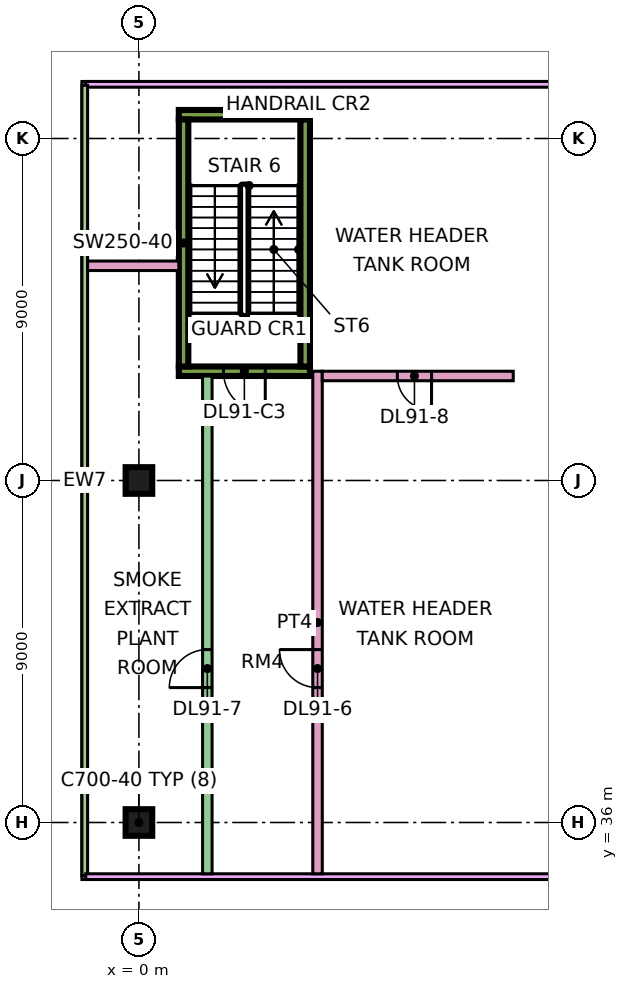
"""IFC4 building model, lengths in metres.
Left out: names, types, materials, properties, quantities, classifications, styles, units other than length and angle.
Written with IfcOpenShell. Run it as: python <this file> out.ifc"""

import sys

from ifc_helpers import new_model, si_unit, direction, frame, frame_2d, origin, origin_2d, place, context, subcontext, project, spatial, polyline, rectangle, outline, extrude, element, fill, save


model = new_model("IFC4")
c1 = context("Model", 3, precision=1e-05, world=origin(), true_north=direction((0.0, 1.0)))
c2 = subcontext(c1, "Body", "Model", "MODEL_VIEW")
j1 = project(units=[si_unit("LENGTHUNIT", "METRE"), si_unit("PLANEANGLEUNIT", "RADIAN")], contexts=[c1])
p1 = place(None, origin())
s1 = spatial("IfcSite", under=j1, at=p1, CompositionType="ELEMENT")
p2 = place(p1, origin())
s2 = spatial("IfcBuilding", under=s1, at=p2, CompositionType="ELEMENT")
p3 = place(p2, frame((0.0, 0.0, 388.9)))
s3 = spatial("IfcBuildingStorey", under=s2, at=p3, CompositionType="ELEMENT", Elevation=388.9)
for number, where, z_axis, x_axis in (
    (1, (0.0, 36.0, 0.0), (0.0, 0.0, 1.0), (1.0, 0.0, 0.0)),
    (2, (0.0, 45.0, 0.0), (0.0, 0.0, 1.0), (1.0, 0.0, 0.0)),
):
    element("IfcColumn", number, at=place(p3, frame(where, z_axis=z_axis, x_axis=x_axis)), inside=s3, PredefinedType="COLUMN", context=c2, shape_type="SweptSolid", body=[
        extrude(rectangle(XDim=0.7, YDim=0.7, at=origin_2d()), origin(), (0.0, 0.0, 1.0), 4.5),
    ])
p4 = place(p3, frame((1.05, 47.875, 0.0), z_axis=(0.0, 0.0, 1.0), x_axis=(1.0, 0.0, 0.0)))
e3 = element("IfcWall", 3, at=p4, inside=s3, PredefinedType="SHEAR", context=c2, shape_type="SweptSolid", body=[
    extrude(rectangle(XDim=3.45, YDim=0.25, at=frame_2d((1.725, 0.0))), origin(), (0.0, 0.0, 1.0), 4.5),
])
p5 = place(p4, frame((1.175, 0.0, 0.0)))
e4 = element("IfcOpeningElement", 4, at=p5, cuts=e3, PredefinedType="OPENING", context=c2, shape_type="SweptSolid", body=[
    extrude(rectangle(XDim=1.1, YDim=2.2, at=frame_2d((0.55, 1.1))), frame((0.0, 0.135, 0.0), z_axis=(0.0, -1.0, 0.0), x_axis=(1.0, 0.0, 0.0)), (0.0, 0.0, 1.0), 0.27),
])
p6 = place(p3, frame((1.05, 54.625, 0.0), z_axis=(0.0, 0.0, 1.0), x_axis=(1.0, 0.0, 0.0)))
e5 = element("IfcWall", 5, at=p6, inside=s3, PredefinedType="SHEAR", context=c2, shape_type="SweptSolid", body=[
    extrude(rectangle(XDim=3.45, YDim=0.25, at=frame_2d((1.725, 0.0))), origin(), (0.0, 0.0, 1.0), 4.5),
])
for number, where, z_axis, x_axis in (
    (6, (1.175, 48.0, 0.0), (0.0, 0.0, 1.0), (0.0, 1.0, 0.0)),
    (7, (4.375, 48.0, 0.0), (0.0, 0.0, 1.0), (0.0, 1.0, 0.0)),
):
    element("IfcWall", number, at=place(p3, frame(where, z_axis=z_axis, x_axis=x_axis)), inside=s3, PredefinedType="SHEAR", context=c2, shape_type="SweptSolid", body=[
        extrude(rectangle(XDim=6.5, YDim=0.25, at=frame_2d((3.25, 0.0))), origin(), (0.0, 0.0, 1.0), 4.5),
    ])
p7 = place(p3, frame((16.26, 55.425, 0.0), z_axis=(0.0, 0.0, 1.0), x_axis=(-1.0, 0.0, 0.0)))
e8 = element("IfcWall", 8, at=p7, inside=s3, PredefinedType="SOLIDWALL", context=c2, shape_type="SweptSolid", body=[
    extrude(outline(polyline([(0.0, 0.0), (17.659, 0.0), (17.659, 4.5), (8.726, 4.5), (7.733, 4.248), (6.741, 3.369), (5.748, 2.489), (4.756, 1.61), (3.763, 1.137), (2.771, 0.916), (1.778, 0.696), (0.785, 0.475), (0.0, 0.3), (0.0, 0.0)])), frame((0.0, 0.075, 0.0), z_axis=(0.0, -1.0, 0.0), x_axis=(1.0, 0.0, 0.0)), (0.0, 0.0, 1.0), 0.15),
])
p8 = place(p3, frame((-1.425, 55.4, 0.0), z_axis=(0.0, 0.0, 1.0), x_axis=(0.0, -1.0, 0.0)))
e9 = element("IfcWall", 9, at=p8, inside=s3, PredefinedType="SOLIDWALL", context=c2, shape_type="SweptSolid", body=[
    extrude(rectangle(XDim=20.8, YDim=0.15, at=frame_2d((10.4, 0.0))), origin(), (0.0, 0.0, 1.0), 4.1),
])
p9 = place(p3, frame((-1.4, 34.575, 0.0), z_axis=(0.0, 0.0, 1.0), x_axis=(1.0, 0.0, 0.0)))
e10 = element("IfcWall", 10, at=p9, inside=s3, PredefinedType="SOLIDWALL", context=c2, shape_type="SweptSolid", body=[
    extrude(outline(polyline([(0.0, 0.0), (17.659, 0.0), (17.659, 0.3), (13.896, 1.137), (12.904, 1.61), (9.926, 4.248), (8.933, 4.5), (0.0, 4.5), (0.0, 0.0)])), frame((0.0, 0.075, 0.0), z_axis=(0.0, -1.0, 0.0), x_axis=(1.0, 0.0, 0.0)), (0.0, 0.0, 1.0), 0.15),
])
p10 = place(p3, frame((-1.35, 50.65, 0.0), z_axis=(0.0, 0.0, 1.0), x_axis=(1.0, 0.0, 0.0)))
e11 = element("IfcWall", 11, at=p10, inside=s3, PredefinedType="PARTITIONING", context=c2, shape_type="SweptSolid", body=[
    extrude(rectangle(XDim=2.4, YDim=0.25, at=frame_2d((1.2, 0.0))), origin(), (0.0, 0.0, 1.0), 2.49),
])
p11 = place(p3, frame((1.8, 34.65, 0.0), z_axis=(0.0, 0.0, 1.0), x_axis=(0.0, 1.0, 0.0)))
e12 = element("IfcWall", 12, at=p11, inside=s3, PredefinedType="PARTITIONING", context=c2, shape_type="SweptSolid", body=[
    extrude(rectangle(XDim=13.1, YDim=0.25, at=frame_2d((6.55, 0.0))), origin(), (0.0, 0.0, 1.0), 4.1),
])
p12 = place(p11, frame((4.9, 0.0, 0.0)))
e13 = element("IfcOpeningElement", 13, at=p12, cuts=e12, PredefinedType="OPENING", context=c2, shape_type="SweptSolid", body=[
    extrude(rectangle(XDim=1.0, YDim=2.1, at=frame_2d((0.5, 1.05))), frame((0.0, 0.135, 0.0), z_axis=(0.0, -1.0, 0.0), x_axis=(1.0, 0.0, 0.0)), (0.0, 0.0, 1.0), 0.27),
])
p13 = place(p3, frame((4.7, 34.65, 0.0), z_axis=(0.0, 0.0, 1.0), x_axis=(0.0, 1.0, 0.0)))
e14 = element("IfcWall", 14, at=p13, inside=s3, PredefinedType="PARTITIONING", context=c2, shape_type="SweptSolid", body=[
    extrude(rectangle(XDim=13.225, YDim=0.25, at=frame_2d((6.613, 0.0))), origin(), (0.0, 0.0, 1.0), 2.49),
])
p14 = place(p13, frame((4.9, 0.0, 0.0)))
e15 = element("IfcOpeningElement", 15, at=p14, cuts=e14, PredefinedType="OPENING", context=c2, shape_type="SweptSolid", body=[
    extrude(rectangle(XDim=1.0, YDim=2.1, at=frame_2d((0.5, 1.05))), frame((0.0, 0.135, 0.0), z_axis=(0.0, -1.0, 0.0), x_axis=(1.0, 0.0, 0.0)), (0.0, 0.0, 1.0), 0.27),
])
p15 = place(p3, frame((4.825, 47.75, 0.0), z_axis=(0.0, 0.0, 1.0), x_axis=(1.0, 0.0, 0.0)))
e16 = element("IfcWall", 16, at=p15, inside=s3, PredefinedType="PARTITIONING", context=c2, shape_type="SweptSolid", body=[
    extrude(rectangle(XDim=5.025, YDim=0.25, at=frame_2d((2.513, 0.0))), origin(), (0.0, 0.0, 1.0), 2.49),
])
p16 = place(p15, frame((1.975, 0.0, 0.0)))
e17 = element("IfcOpeningElement", 17, at=p16, cuts=e16, PredefinedType="OPENING", context=c2, shape_type="SweptSolid", body=[
    extrude(rectangle(XDim=0.9, YDim=2.1, at=frame_2d((0.45, 1.05))), frame((0.0, 0.135, 0.0), z_axis=(0.0, -1.0, 0.0), x_axis=(1.0, 0.0, 0.0)), (0.0, 0.0, 1.0), 0.27),
])
p17 = place(p5, origin())
e18 = element("IfcDoor", 18, at=p17, inside=s3, OperationType="SINGLE_SWING_RIGHT", PredefinedType="DOOR", context=c2, shape_type="SweptSolid", body=[
    extrude(rectangle(XDim=1.1, YDim=2.2, at=frame_2d((0.55, 1.1))), frame((0.0, 0.025, 0.0), z_axis=(0.0, -1.0, 0.0), x_axis=(1.0, 0.0, 0.0)), (0.0, 0.0, 1.0), 0.05),
])
fill(e4, e18)
p18 = place(p14, frame((1.0, 0.0, 0.0), z_axis=(0.0, 0.0, 1.0), x_axis=(-1.0, 0.0, 0.0)))
e19 = element("IfcDoor", 19, at=p18, inside=s3, OperationType="SINGLE_SWING_RIGHT", PredefinedType="DOOR", context=c2, shape_type="SweptSolid", body=[
    extrude(rectangle(XDim=1.0, YDim=2.1, at=frame_2d((0.5, 1.05))), frame((0.0, 0.025, 0.0), z_axis=(0.0, -1.0, 0.0), x_axis=(1.0, 0.0, 0.0)), (0.0, 0.0, 1.0), 0.05),
])
fill(e15, e19)
p19 = place(p12, origin())
e20 = element("IfcDoor", 20, at=p19, inside=s3, OperationType="SINGLE_SWING_LEFT", PredefinedType="DOOR", context=c2, shape_type="SweptSolid", body=[
    extrude(rectangle(XDim=1.0, YDim=2.1, at=frame_2d((0.5, 1.05))), frame((0.0, 0.025, 0.0), z_axis=(0.0, -1.0, 0.0), x_axis=(1.0, 0.0, 0.0)), (0.0, 0.0, 1.0), 0.05),
])
fill(e13, e20)
p20 = place(p16, origin())
e21 = element("IfcDoor", 21, at=p20, inside=s3, OperationType="SINGLE_SWING_RIGHT", PredefinedType="DOOR", context=c2, shape_type="SweptSolid", body=[
    extrude(rectangle(XDim=0.9, YDim=2.1, at=frame_2d((0.45, 1.05))), frame((0.0, 0.025, 0.0), z_axis=(0.0, -1.0, 0.0), x_axis=(1.0, 0.0, 0.0)), (0.0, 0.0, 1.0), 0.05),
])
fill(e17, e21)
save(model, sys.argv[1])
